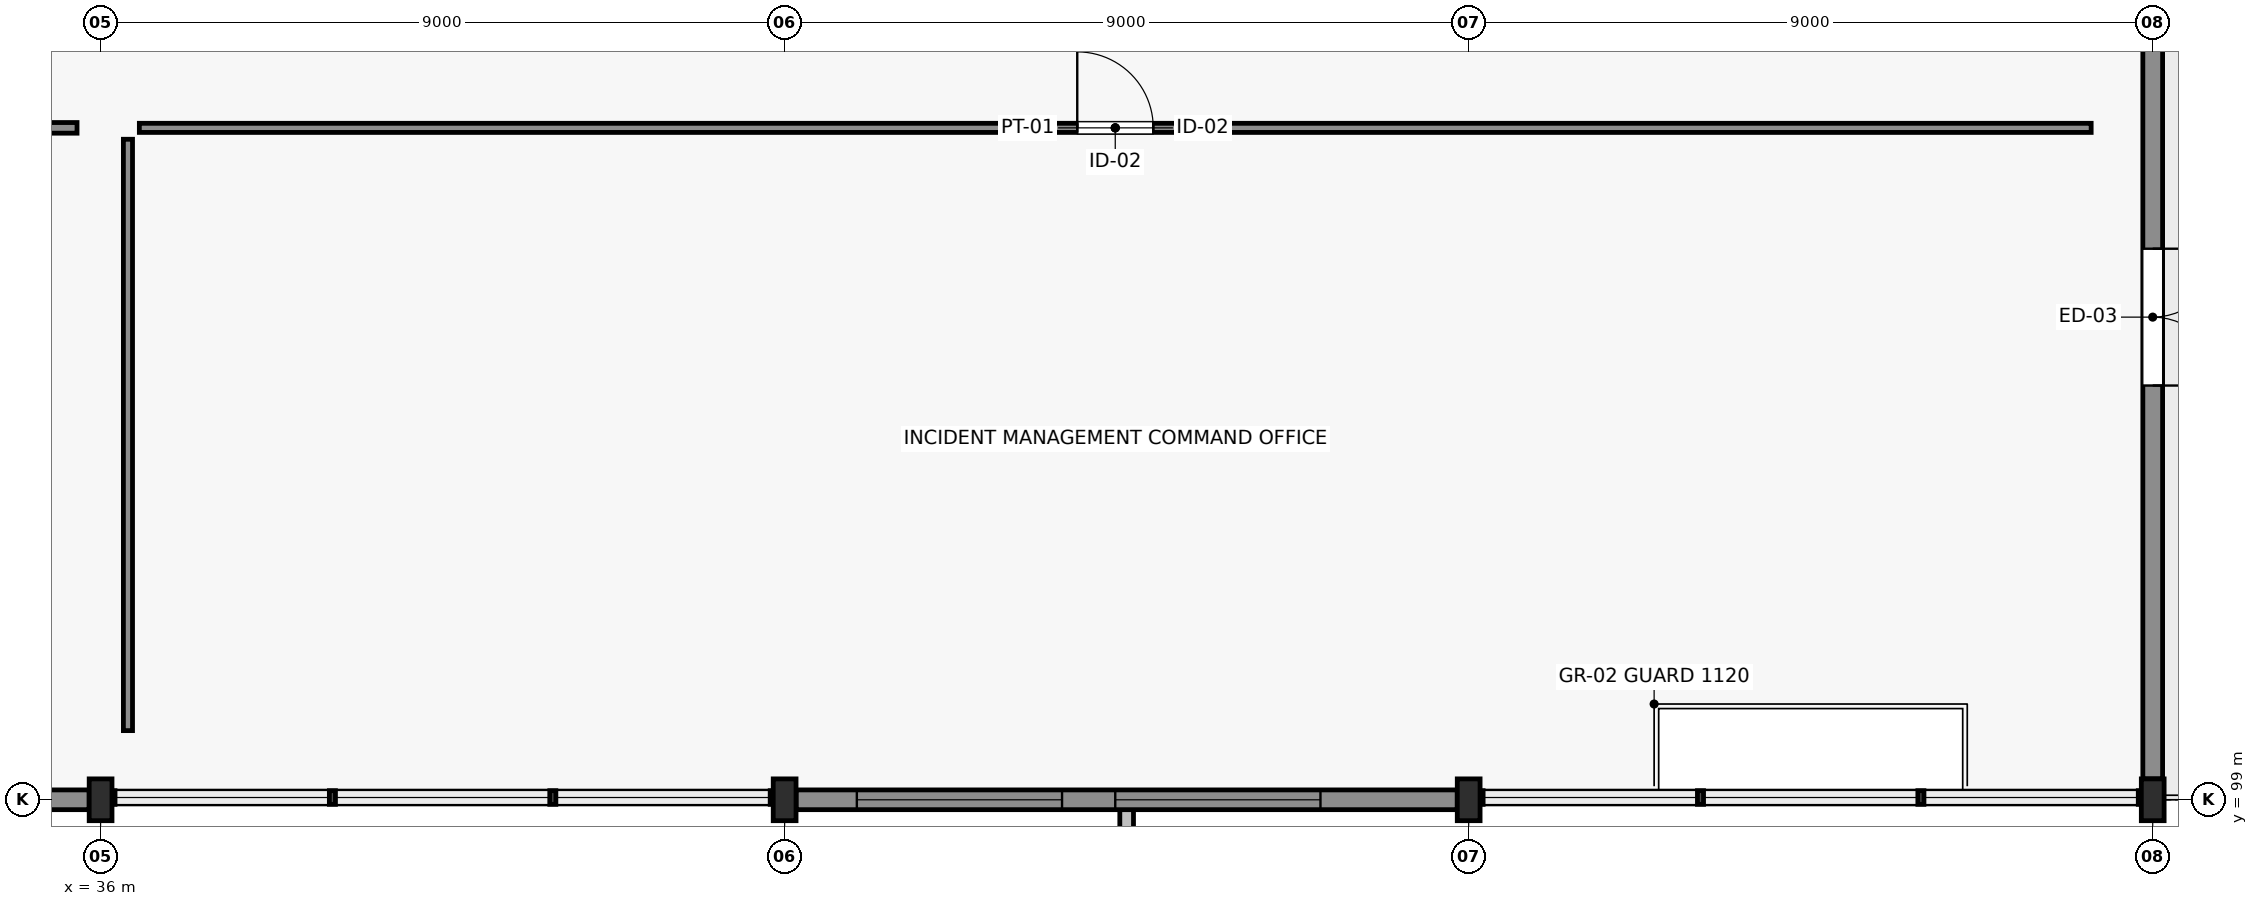
"""IFC4 building model, lengths in metres.
Left out: names, types, materials, properties, quantities, classifications, styles, units other than length and angle.
Written with IfcOpenShell. Run it as: python <this file> out.ifc"""

import sys

from ifc_helpers import new_model, si_unit, direction, frame, frame_2d, origin, origin_2d, place, context, subcontext, project, spatial, rectangle, i_section, extrude, element, fill, save


model = new_model("IFC4")
c1 = context("Model", 3, precision=1e-05, world=origin(), true_north=direction((0.0, 1.0)))
c2 = subcontext(c1, "Body", "Model", "MODEL_VIEW")
j1 = project(units=[si_unit("LENGTHUNIT", "METRE"), si_unit("PLANEANGLEUNIT", "RADIAN")], contexts=[c1])
p1 = place(None, origin())
s1 = spatial("IfcSite", under=j1, at=p1, CompositionType="ELEMENT")
p2 = place(p1, origin())
s2 = spatial("IfcBuilding", under=s1, at=p2, CompositionType="ELEMENT")
p3 = place(p2, frame((0.0, 0.0, 19.5)))
s3 = spatial("IfcBuildingStorey", under=s2, at=p3, CompositionType="ELEMENT", Elevation=19.5)
for number, where, z_axis, x_axis in (
    (1, (36.0, 99.0, 0.0), (0.0, 0.0, 1.0), (1.0, 0.0, 0.0)),
    (2, (45.0, 99.0, 0.0), (0.0, 0.0, 1.0), (1.0, 0.0, 0.0)),
    (3, (54.0, 99.0, 0.0), (0.0, 0.0, 1.0), (1.0, 0.0, 0.0)),
    (4, (63.0, 99.0, 0.0), (0.0, 0.0, 1.0), (1.0, 0.0, 0.0)),
):
    element("IfcColumn", number, at=place(p3, frame(where, z_axis=z_axis, x_axis=x_axis)), inside=s3, PredefinedType="COLUMN", context=c2, shape_type="SweptSolid", body=[
        extrude(i_section(OverallWidth=0.3, OverallDepth=0.55, WebThickness=0.015, FlangeThickness=0.029, FilletRadius=0.027, at=origin_2d()), origin(), (0.0, 0.0, 1.0), 4.275),
    ])
p4 = place(p3, frame((35.85, 99.0, 0.0), z_axis=(0.0, 0.0, 1.0), x_axis=(-1.0, 0.0, 0.0)))
e5 = element("IfcWall", 5, at=p4, inside=s3, PredefinedType="SOLIDWALL", context=c2, shape_type="SweptSolid", body=[
    extrude(rectangle(XDim=8.7, YDim=0.26, at=frame_2d((4.35, 0.0))), origin(), (0.0, 0.0, 1.0), 3.85),
])
p5 = place(p4, frame((1.8, 0.0, 1.05)))
e6 = element("IfcOpeningElement", 6, at=p5, cuts=e5, PredefinedType="OPENING", context=c2, shape_type="SweptSolid", body=[
    extrude(rectangle(XDim=2.7, YDim=1.8, at=frame_2d((1.35, 0.9))), frame((0.0, 0.14, 0.0), z_axis=(0.0, -1.0, 0.0), x_axis=(1.0, 0.0, 0.0)), (0.0, 0.0, 1.0), 0.28),
])
p6 = place(p4, frame((5.2, 0.0, 1.05)))
e7 = element("IfcOpeningElement", 7, at=p6, cuts=e5, PredefinedType="OPENING", context=c2, shape_type="SweptSolid", body=[
    extrude(rectangle(XDim=2.7, YDim=1.8, at=frame_2d((1.35, 0.9))), frame((0.0, 0.14, 0.0), z_axis=(0.0, -1.0, 0.0), x_axis=(1.0, 0.0, 0.0)), (0.0, 0.0, 1.0), 0.28),
])
p7 = place(p3, frame((53.85, 99.0, 0.0), z_axis=(0.0, 0.0, 1.0), x_axis=(-1.0, 0.0, 0.0)))
e8 = element("IfcWall", 8, at=p7, inside=s3, PredefinedType="SOLIDWALL", context=c2, shape_type="SweptSolid", body=[
    extrude(rectangle(XDim=8.7, YDim=0.26, at=frame_2d((4.35, 0.0))), origin(), (0.0, 0.0, 1.0), 3.85),
])
p8 = place(p7, frame((1.8, 0.0, 1.05)))
e9 = element("IfcOpeningElement", 9, at=p8, cuts=e8, PredefinedType="OPENING", context=c2, shape_type="SweptSolid", body=[
    extrude(rectangle(XDim=2.7, YDim=1.8, at=frame_2d((1.35, 0.9))), frame((0.0, 0.14, 0.0), z_axis=(0.0, -1.0, 0.0), x_axis=(1.0, 0.0, 0.0)), (0.0, 0.0, 1.0), 0.28),
])
p9 = place(p7, frame((5.2, 0.0, 1.05)))
e10 = element("IfcOpeningElement", 10, at=p9, cuts=e8, PredefinedType="OPENING", context=c2, shape_type="SweptSolid", body=[
    extrude(rectangle(XDim=2.7, YDim=1.8, at=frame_2d((1.35, 0.9))), frame((0.0, 0.14, 0.0), z_axis=(0.0, -1.0, 0.0), x_axis=(1.0, 0.0, 0.0)), (0.0, 0.0, 1.0), 0.28),
])
p10 = place(p3, frame((63.0, 110.225, 0.0), z_axis=(0.0, 0.0, 1.0), x_axis=(0.0, -1.0, 0.0)))
e11 = element("IfcWall", 11, at=p10, inside=s3, PredefinedType="SOLIDWALL", context=c2, shape_type="SweptSolid", body=[
    extrude(rectangle(XDim=10.95, YDim=0.26, at=frame_2d((5.475, 0.0))), origin(), (0.0, 0.0, 1.0), 3.85),
])
p11 = place(p10, frame((3.975, 0.0, 0.0)))
e12 = element("IfcOpeningElement", 12, at=p11, cuts=e11, PredefinedType="OPENING", context=c2, shape_type="SweptSolid", body=[
    extrude(rectangle(XDim=1.8, YDim=2.3, at=frame_2d((0.9, 1.15))), frame((0.0, 0.14, 0.0), z_axis=(0.0, -1.0, 0.0), x_axis=(1.0, 0.0, 0.0)), (0.0, 0.0, 1.0), 0.28),
])
p12 = place(p3, frame((0.81, 107.84, 0.0), z_axis=(0.0, 0.0, 1.0), x_axis=(1.0, 0.0, 0.0)))
e13 = element("IfcWall", 13, at=p12, inside=s3, PredefinedType="PARTITIONING", context=c2, shape_type="SweptSolid", body=[
    extrude(rectangle(XDim=34.88, YDim=0.14, at=frame_2d((17.44, 0.0))), origin(), (0.0, 0.0, 1.0), 3.695),
])
p13 = place(p12, frame((16.69, 0.0, 0.0)))
e14 = element("IfcOpeningElement", 14, at=p13, cuts=e13, PredefinedType="OPENING", context=c2, shape_type="SweptSolid", body=[
    extrude(rectangle(XDim=1.5, YDim=2.2, at=frame_2d((0.75, 1.1))), frame((0.0, 0.08, 0.0), z_axis=(0.0, -1.0, 0.0), x_axis=(1.0, 0.0, 0.0)), (0.0, 0.0, 1.0), 0.16),
])
p14 = place(p12, frame((8.0, 0.0, 1.05)))
e15 = element("IfcOpeningElement", 15, at=p14, cuts=e13, PredefinedType="OPENING", context=c2, shape_type="SweptSolid", body=[
    extrude(rectangle(XDim=2.6, YDim=1.5, at=frame_2d((1.3, 0.75))), frame((0.0, 0.08, 0.0), z_axis=(0.0, -1.0, 0.0), x_axis=(1.0, 0.0, 0.0)), (0.0, 0.0, 1.0), 0.16),
])
p15 = place(p3, frame((36.51, 107.84, 0.0), z_axis=(0.0, 0.0, 1.0), x_axis=(1.0, 0.0, 0.0)))
e16 = element("IfcWall", 16, at=p15, inside=s3, PredefinedType="PARTITIONING", context=c2, shape_type="SweptSolid", body=[
    extrude(rectangle(XDim=25.68, YDim=0.12, at=frame_2d((12.84, 0.0))), origin(), (0.0, 0.0, 1.0), 3.695),
])
p16 = place(p15, frame((12.34, 0.0, 0.0)))
e17 = element("IfcOpeningElement", 17, at=p16, cuts=e16, PredefinedType="OPENING", context=c2, shape_type="SweptSolid", body=[
    extrude(rectangle(XDim=1.0, YDim=2.15, at=frame_2d((0.5, 1.075))), frame((0.0, 0.07, 0.0), z_axis=(0.0, -1.0, 0.0), x_axis=(1.0, 0.0, 0.0)), (0.0, 0.0, 1.0), 0.14),
])
p17 = place(p3, frame((36.36, 99.91, 0.0), z_axis=(0.0, 0.0, 1.0), x_axis=(0.0, 1.0, 0.0)))
e18 = element("IfcWall", 18, at=p17, inside=s3, PredefinedType="PARTITIONING", context=c2, shape_type="SweptSolid", body=[
    extrude(rectangle(XDim=7.78, YDim=0.12, at=frame_2d((3.89, 0.0))), origin(), (0.0, 0.0, 1.0), 4.25),
])
p18 = place(p8, origin())
e19 = element("IfcWindow", 19, at=p18, inside=s3, PartitioningType="SINGLE_PANEL", PredefinedType="WINDOW", context=c2, shape_type="SweptSolid", body=[
    extrude(rectangle(XDim=2.7, YDim=1.8, at=frame_2d((1.35, 0.9))), frame((0.0, 0.03, 0.0), z_axis=(0.0, -1.0, 0.0), x_axis=(1.0, 0.0, 0.0)), (0.0, 0.0, 1.0), 0.06),
])
fill(e9, e19)
p19 = place(p9, origin())
e20 = element("IfcWindow", 20, at=p19, inside=s3, PartitioningType="SINGLE_PANEL", PredefinedType="WINDOW", context=c2, shape_type="SweptSolid", body=[
    extrude(rectangle(XDim=2.7, YDim=1.8, at=frame_2d((1.35, 0.9))), frame((0.0, 0.03, 0.0), z_axis=(0.0, -1.0, 0.0), x_axis=(1.0, 0.0, 0.0)), (0.0, 0.0, 1.0), 0.06),
])
fill(e10, e20)
p20 = place(p11, origin())
e21 = element("IfcDoor", 21, at=p20, inside=s3, OperationType="DOUBLE_DOOR_SINGLE_SWING", PredefinedType="DOOR", context=c2, shape_type="SweptSolid", body=[
    extrude(rectangle(XDim=1.8, YDim=2.3, at=frame_2d((0.9, 1.15))), frame((0.0, 0.025, 0.0), z_axis=(0.0, -1.0, 0.0), x_axis=(1.0, 0.0, 0.0)), (0.0, 0.0, 1.0), 0.05),
])
fill(e12, e21)
p21 = place(p16, origin())
e22 = element("IfcDoor", 22, at=p21, inside=s3, OperationType="SINGLE_SWING_LEFT", PredefinedType="DOOR", context=c2, shape_type="SweptSolid", body=[
    extrude(rectangle(XDim=1.0, YDim=2.15, at=frame_2d((0.5, 1.075))), frame((0.0, 0.025, 0.0), z_axis=(0.0, -1.0, 0.0), x_axis=(1.0, 0.0, 0.0)), (0.0, 0.0, 1.0), 0.05),
])
fill(e17, e22)
save(model, sys.argv[1])
